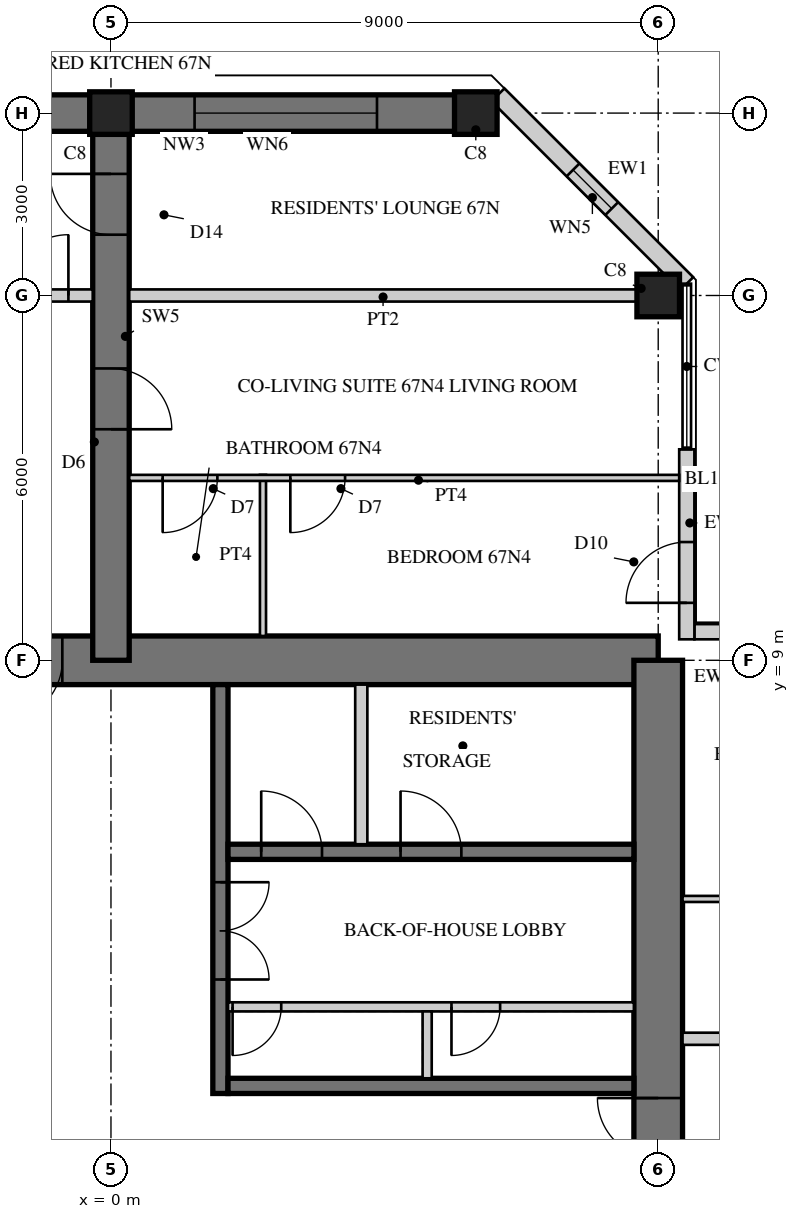
"""IFC4 building model, lengths in metres.
Left out: names, types, materials, properties, quantities, classifications, styles, units other than length and angle.
Written with IfcOpenShell. Run it as: python <this file> out.ifc"""

import sys

from ifc_helpers import new_model, si_unit, direction, frame, frame_2d, origin, origin_2d, place, context, subcontext, project, spatial, rectangle, hollow_rectangle, extrude, element, fill, save


model = new_model("IFC4")
c1 = context("Model", 3, precision=1e-05, world=origin(), true_north=direction((0.0, 1.0)))
c2 = subcontext(c1, "Body", "Model", "MODEL_VIEW")
j1 = project(units=[si_unit("LENGTHUNIT", "METRE"), si_unit("PLANEANGLEUNIT", "RADIAN")], contexts=[c1])
p1 = place(None, origin())
s1 = spatial("IfcSite", under=j1, at=p1, CompositionType="ELEMENT")
p2 = place(p1, origin())
s2 = spatial("IfcBuilding", under=s1, at=p2, CompositionType="ELEMENT")
p3 = place(p2, frame((0.0, 0.0, 261.1)))
s3 = spatial("IfcBuildingStorey", under=s2, at=p3, CompositionType="ELEMENT", Elevation=261.1)
p4 = place(p3, frame((9.0, 9.0, 0.0), z_axis=(0.0, 0.0, 1.0), x_axis=(-1.0, 0.0, 0.0)))
e1 = element("IfcWall", 1, at=p4, inside=s3, PredefinedType="SHEAR", context=c2, shape_type="SweptSolid", body=[
    extrude(rectangle(XDim=18.0, YDim=0.8, at=frame_2d((9.0, 0.0))), origin(), (0.0, 0.0, 1.0), 3.4),
])
p5 = place(p4, frame((9.8, 0.0, 0.0)))
e2 = element("IfcOpeningElement", 2, at=p5, cuts=e1, PredefinedType="OPENING", context=c2, shape_type="SweptSolid", body=[
    extrude(rectangle(XDim=1.0, YDim=2.4, at=frame_2d((0.5, 1.2))), frame((0.0, 0.41, 0.0), z_axis=(0.0, -1.0, 0.0), x_axis=(1.0, 0.0, 0.0)), (0.0, 0.0, 1.0), 0.82),
])
p6 = place(p3, frame((9.0, -9.0, 0.0), z_axis=(0.0, 0.0, 1.0), x_axis=(0.0, 1.0, 0.0)))
e3 = element("IfcWall", 3, at=p6, inside=s3, PredefinedType="SHEAR", context=c2, shape_type="SweptSolid", body=[
    extrude(rectangle(XDim=18.0, YDim=0.8, at=frame_2d((9.0, 0.0))), origin(), (0.0, 0.0, 1.0), 3.4),
])
p7 = place(p6, frame((9.8, 0.0, 0.0)))
e4 = element("IfcOpeningElement", 4, at=p7, cuts=e3, PredefinedType="OPENING", context=c2, shape_type="SweptSolid", body=[
    extrude(rectangle(XDim=1.0, YDim=2.4, at=frame_2d((0.5, 1.2))), frame((0.0, 0.41, 0.0), z_axis=(0.0, -1.0, 0.0), x_axis=(1.0, 0.0, 0.0)), (0.0, 0.0, 1.0), 0.82),
])
p8 = place(p3, frame((1.8, 1.875, 0.0), z_axis=(0.0, 0.0, 1.0), x_axis=(0.0, 1.0, 0.0)))
e5 = element("IfcWall", 5, at=p8, inside=s3, PredefinedType="SHEAR", context=c2, shape_type="SweptSolid", body=[
    extrude(rectangle(XDim=6.725, YDim=0.25, at=frame_2d((3.363, 0.0))), origin(), (0.0, 0.0, 1.0), 3.4),
])
p9 = place(p8, frame((1.875, 0.0, 0.0)))
e6 = element("IfcOpeningElement", 6, at=p9, cuts=e5, PredefinedType="OPENING", context=c2, shape_type="SweptSolid", body=[
    extrude(rectangle(XDim=1.6, YDim=2.4, at=frame_2d((0.8, 1.2))), frame((0.0, 0.135, 0.0), z_axis=(0.0, -1.0, 0.0), x_axis=(1.0, 0.0, 0.0)), (0.0, 0.0, 1.0), 0.27),
])
p10 = place(p3, frame((1.925, 2.0, 0.0), z_axis=(0.0, 0.0, 1.0), x_axis=(1.0, 0.0, 0.0)))
e7 = element("IfcWall", 7, at=p10, inside=s3, PredefinedType="SHEAR", context=c2, shape_type="SweptSolid", body=[
    extrude(rectangle(XDim=6.675, YDim=0.25, at=frame_2d((3.337, 0.0))), origin(), (0.0, 0.0, 1.0), 3.4),
])
p11 = place(p3, frame((1.925, 5.85, 0.0), z_axis=(0.0, 0.0, 1.0), x_axis=(1.0, 0.0, 0.0)))
e8 = element("IfcWall", 8, at=p11, inside=s3, PredefinedType="SHEAR", context=c2, shape_type="SweptSolid", body=[
    extrude(rectangle(XDim=6.675, YDim=0.25, at=frame_2d((3.337, 0.0))), origin(), (0.0, 0.0, 1.0), 3.4),
])
p12 = place(p11, frame((0.546, 0.0, 0.0)))
e9 = element("IfcOpeningElement", 9, at=p12, cuts=e8, PredefinedType="OPENING", context=c2, shape_type="SweptSolid", body=[
    extrude(rectangle(XDim=1.0, YDim=2.1, at=frame_2d((0.5, 1.05))), frame((0.0, 0.135, 0.0), z_axis=(0.0, -1.0, 0.0), x_axis=(1.0, 0.0, 0.0)), (0.0, 0.0, 1.0), 0.27),
])
p13 = place(p11, frame((2.837, 0.0, 0.0)))
e10 = element("IfcOpeningElement", 10, at=p13, cuts=e8, PredefinedType="OPENING", context=c2, shape_type="SweptSolid", body=[
    extrude(rectangle(XDim=1.0, YDim=2.1, at=frame_2d((0.5, 1.05))), frame((0.0, 0.135, 0.0), z_axis=(0.0, -1.0, 0.0), x_axis=(1.0, 0.0, 0.0)), (0.0, 0.0, 1.0), 0.27),
])
p14 = place(p3, frame((1.925, 3.3, 0.0), z_axis=(0.0, 0.0, 1.0), x_axis=(1.0, 0.0, 0.0)))
e11 = element("IfcWall", 11, at=p14, inside=s3, PredefinedType="PARTITIONING", context=c2, shape_type="SweptSolid", body=[
    extrude(rectangle(XDim=6.675, YDim=0.15, at=frame_2d((3.337, 0.0))), origin(), (0.0, 0.0, 1.0), 3.4),
])
p15 = place(p14, frame((0.075, 0.0, 0.0)))
e12 = element("IfcOpeningElement", 12, at=p15, cuts=e11, PredefinedType="OPENING", context=c2, shape_type="SweptSolid", body=[
    extrude(rectangle(XDim=0.8, YDim=2.1, at=frame_2d((0.4, 1.05))), frame((0.0, 0.085, 0.0), z_axis=(0.0, -1.0, 0.0), x_axis=(1.0, 0.0, 0.0)), (0.0, 0.0, 1.0), 0.17),
])
p16 = place(p14, frame((3.675, 0.0, 0.0)))
e13 = element("IfcOpeningElement", 13, at=p16, cuts=e11, PredefinedType="OPENING", context=c2, shape_type="SweptSolid", body=[
    extrude(rectangle(XDim=0.8, YDim=2.1, at=frame_2d((0.4, 1.05))), frame((0.0, 0.085, 0.0), z_axis=(0.0, -1.0, 0.0), x_axis=(1.0, 0.0, 0.0)), (0.0, 0.0, 1.0), 0.17),
])
p17 = place(p3, frame((5.2, 2.125, 0.0), z_axis=(0.0, 0.0, 1.0), x_axis=(0.0, 1.0, 0.0)))
e14 = element("IfcWall", 14, at=p17, inside=s3, PredefinedType="PARTITIONING", context=c2, shape_type="SweptSolid", body=[
    extrude(rectangle(XDim=1.1, YDim=0.15, at=frame_2d((0.55, 0.0))), origin(), (0.0, 0.0, 1.0), 3.4),
])
p18 = place(p3, frame((4.117, 5.975, 0.0), z_axis=(0.0, 0.0, 1.0), x_axis=(0.0, 1.0, 0.0)))
e15 = element("IfcWall", 15, at=p18, inside=s3, PredefinedType="PARTITIONING", context=c2, shape_type="SweptSolid", body=[
    extrude(rectangle(XDim=2.625, YDim=0.2, at=frame_2d((1.312, 0.0))), origin(), (0.0, 0.0, 1.0), 3.4),
])
p19 = place(p3, frame((0.0, 9.0, 0.0), z_axis=(0.0, 0.0, 1.0), x_axis=(0.0, 1.0, 0.0)))
e16 = element("IfcWall", 16, at=p19, inside=s3, PredefinedType="SHEAR", context=c2, shape_type="SweptSolid", body=[
    extrude(rectangle(XDim=9.0, YDim=0.6, at=frame_2d((4.5, 0.0))), origin(), (0.0, 0.0, 1.0), 3.4),
])
p20 = place(p19, frame((3.8, 0.0, 0.0)))
e17 = element("IfcOpeningElement", 17, at=p20, cuts=e16, PredefinedType="OPENING", context=c2, shape_type="SweptSolid", body=[
    extrude(rectangle(XDim=1.0, YDim=2.15, at=frame_2d((0.5, 1.075))), frame((0.0, 0.31, 0.0), z_axis=(0.0, -1.0, 0.0), x_axis=(1.0, 0.0, 0.0)), (0.0, 0.0, 1.0), 0.62),
])
p21 = place(p19, frame((7.0, 0.0, 0.0)))
e18 = element("IfcOpeningElement", 18, at=p21, cuts=e16, PredefinedType="OPENING", context=c2, shape_type="SweptSolid", body=[
    extrude(rectangle(XDim=1.0, YDim=2.2, at=frame_2d((0.5, 1.1))), frame((0.0, 0.31, 0.0), z_axis=(0.0, -1.0, 0.0), x_axis=(1.0, 0.0, 0.0)), (0.0, 0.0, 1.0), 0.62),
])
p22 = place(p3, frame((6.0, 18.0, 0.0), z_axis=(0.0, 0.0, 1.0), x_axis=(-1.0, 0.0, 0.0)))
e19 = element("IfcWall", 19, at=p22, inside=s3, PredefinedType="SHEAR", context=c2, shape_type="SweptSolid", body=[
    extrude(rectangle(XDim=12.0, YDim=0.6, at=frame_2d((6.0, 0.0))), origin(), (0.0, 0.0, 1.0), 3.4),
])
p23 = place(p22, frame((1.625, 0.0, 0.6)))
e20 = element("IfcOpeningElement", 20, at=p23, cuts=e19, PredefinedType="OPENING", context=c2, shape_type="SweptSolid", body=[
    extrude(rectangle(XDim=3.0, YDim=2.4, at=frame_2d((1.5, 1.2))), frame((0.0, 0.31, 0.0), z_axis=(0.0, -1.0, 0.0), x_axis=(1.0, 0.0, 0.0)), (0.0, 0.0, 1.0), 0.62),
])
p24 = place(p22, frame((7.375, 0.0, 0.6)))
e21 = element("IfcOpeningElement", 21, at=p24, cuts=e19, PredefinedType="OPENING", context=c2, shape_type="SweptSolid", body=[
    extrude(rectangle(XDim=3.0, YDim=2.4, at=frame_2d((1.5, 1.2))), frame((0.0, 0.31, 0.0), z_axis=(0.0, -1.0, 0.0), x_axis=(1.0, 0.0, 0.0)), (0.0, 0.0, 1.0), 0.62),
])
for number, where, z_axis, x_axis in (
    (22, (9.0, 15.0, 0.0), (0.0, 0.0, 1.0), (1.0, 0.0, 0.0)),
    (23, (6.0, 18.0, 0.0), (0.0, 0.0, 1.0), (1.0, 0.0, 0.0)),
    (24, (0.0, 18.0, 0.0), (0.0, 0.0, 1.0), (1.0, 0.0, 0.0)),
):
    element("IfcColumn", number, at=place(p3, frame(where, z_axis=z_axis, x_axis=x_axis)), inside=s3, PredefinedType="COLUMN", context=c2, shape_type="SweptSolid", body=[
        extrude(rectangle(XDim=0.7, YDim=0.7, at=origin_2d()), origin(), (0.0, 0.0, 1.0), 3.4),
    ])
p25 = place(p3, frame((12.47, 9.47, 0.0), z_axis=(0.0, 0.0, 1.0), x_axis=(-1.0, 0.0, 0.0)))
e25 = element("IfcWall", 25, at=p25, inside=s3, PredefinedType="SOLIDWALL", context=c2, shape_type="SweptSolid", body=[
    extrude(rectangle(XDim=2.875, YDim=0.25, at=frame_2d((1.438, 0.0))), origin(), (0.0, 0.0, 1.0), 3.22),
])
p26 = place(p25, frame((0.6, 0.0, 0.0)))
e26 = element("IfcOpeningElement", 26, at=p26, cuts=e25, PredefinedType="OPENING", context=c2, shape_type="SweptSolid", body=[
    extrude(rectangle(XDim=1.0, YDim=2.2, at=frame_2d((0.5, 1.1))), frame((0.0, 0.135, 0.0), z_axis=(0.0, -1.0, 0.0), x_axis=(1.0, 0.0, 0.0)), (0.0, 0.0, 1.0), 0.27),
])
p27 = place(p3, frame((9.47, 9.345, 0.0), z_axis=(0.0, 0.0, 1.0), x_axis=(0.0, 1.0, 0.0)))
e27 = element("IfcWall", 27, at=p27, inside=s3, PredefinedType="SOLIDWALL", context=c2, shape_type="SweptSolid", body=[
    extrude(rectangle(XDim=3.125, YDim=0.25, at=frame_2d((1.562, 0.0))), origin(), (0.0, 0.0, 1.0), 3.22),
])
p28 = place(p27, frame((0.6, 0.0, 0.0)))
e28 = element("IfcOpeningElement", 28, at=p28, cuts=e27, PredefinedType="OPENING", context=c2, shape_type="SweptSolid", body=[
    extrude(rectangle(XDim=1.0, YDim=2.2, at=frame_2d((0.5, 1.1))), frame((0.0, 0.135, 0.0), z_axis=(0.0, -1.0, 0.0), x_axis=(1.0, 0.0, 0.0)), (0.0, 0.0, 1.0), 0.27),
])
p29 = place(p3, frame((9.47, 15.195, 0.0), z_axis=(0.0, 0.0, 1.0), x_axis=(-0.70707898447, 0.707134576811, 0.0)))
e29 = element("IfcWall", 29, at=p29, inside=s3, PredefinedType="SOLIDWALL", context=c2, shape_type="SweptSolid", body=[
    extrude(rectangle(XDim=4.392, YDim=0.3, at=frame_2d((2.196, 0.0))), origin(), (0.0, 0.0, 1.0), 3.22),
])
p30 = place(p29, frame((1.746, 0.0, 0.3)))
e30 = element("IfcOpeningElement", 30, at=p30, cuts=e29, PredefinedType="OPENING", context=c2, shape_type="SweptSolid", body=[
    extrude(rectangle(XDim=0.9, YDim=2.4, at=frame_2d((0.45, 1.2))), frame((0.0, 0.16, 0.0), z_axis=(0.0, -1.0, 0.0), x_axis=(1.0, 0.0, 0.0)), (0.0, 0.0, 1.0), 0.32),
])
p31 = place(p3, frame((2.5, 9.4, 0.0), z_axis=(0.0, 0.0, 1.0), x_axis=(0.0, 1.0, 0.0)))
e31 = element("IfcWall", 31, at=p31, inside=s3, PredefinedType="PARTITIONING", context=c2, shape_type="SweptSolid", body=[
    extrude(rectangle(XDim=2.65, YDim=0.1, at=frame_2d((1.325, 0.0))), origin(), (0.0, 0.0, 1.0), 3.22),
])
p32 = place(p3, frame((9.345, 12.0, 0.0), z_axis=(0.0, 0.0, 1.0), x_axis=(-1.0, 0.0, 0.0)))
e32 = element("IfcWall", 32, at=p32, inside=s3, PredefinedType="PARTITIONING", context=c2, shape_type="SweptSolid", body=[
    extrude(rectangle(XDim=9.045, YDim=0.1, at=frame_2d((4.522, 0.0))), origin(), (0.0, 0.0, 1.0), 3.22),
])
p33 = place(p32, frame((5.495, 0.0, 0.0)))
e33 = element("IfcOpeningElement", 33, at=p33, cuts=e32, PredefinedType="OPENING", context=c2, shape_type="SweptSolid", body=[
    extrude(rectangle(XDim=0.9, YDim=2.1, at=frame_2d((0.45, 1.05))), frame((0.0, 0.06, 0.0), z_axis=(0.0, -1.0, 0.0), x_axis=(1.0, 0.0, 0.0)), (0.0, 0.0, 1.0), 0.12),
])
p34 = place(p32, frame((7.595, 0.0, 0.0)))
e34 = element("IfcOpeningElement", 34, at=p34, cuts=e32, PredefinedType="OPENING", context=c2, shape_type="SweptSolid", body=[
    extrude(rectangle(XDim=0.9, YDim=2.1, at=frame_2d((0.45, 1.05))), frame((0.0, 0.06, 0.0), z_axis=(0.0, -1.0, 0.0), x_axis=(1.0, 0.0, 0.0)), (0.0, 0.0, 1.0), 0.12),
])
p35 = place(p3, frame((8.65, 15.0, 0.0), z_axis=(0.0, 0.0, 1.0), x_axis=(-1.0, 0.0, 0.0)))
e35 = element("IfcWall", 35, at=p35, inside=s3, PredefinedType="SOLIDWALL", context=c2, shape_type="SweptSolid", body=[
    extrude(rectangle(XDim=8.35, YDim=0.2, at=frame_2d((4.175, 0.0))), origin(), (0.0, 0.0, 1.0), 2.52),
])
p36 = place(p3, frame((-0.3, 15.0, 0.0), z_axis=(0.0, 0.0, 1.0), x_axis=(-1.0, 0.0, 0.0)))
e36 = element("IfcWall", 36, at=p36, inside=s3, PredefinedType="SOLIDWALL", context=c2, shape_type="SweptSolid", body=[
    extrude(rectangle(XDim=8.35, YDim=0.2, at=frame_2d((4.175, 0.0))), origin(), (0.0, 0.0, 1.0), 2.52),
])
p37 = place(p36, frame((0.4, 0.0, 0.0)))
e37 = element("IfcOpeningElement", 37, at=p37, cuts=e36, PredefinedType="OPENING", context=c2, shape_type="SweptSolid", body=[
    extrude(rectangle(XDim=1.0, YDim=2.2, at=frame_2d((0.5, 1.1))), frame((0.0, 0.11, 0.0), z_axis=(0.0, -1.0, 0.0), x_axis=(1.0, 0.0, 0.0)), (0.0, 0.0, 1.0), 0.22),
])
p38 = place(p3, frame((9.4, 5.075, 0.0), z_axis=(0.0, 0.0, 1.0), x_axis=(1.0, 0.0, 0.0)))
e38 = element("IfcWall", 38, at=p38, inside=s3, PredefinedType="PARTITIONING", context=c2, shape_type="SweptSolid", body=[
    extrude(rectangle(XDim=3.25, YDim=0.1, at=frame_2d((1.625, 0.0))), origin(), (0.0, 0.0, 1.0), 3.22),
])
p39 = place(p3, frame((9.4, 2.775, 0.0), z_axis=(0.0, 0.0, 1.0), x_axis=(1.0, 0.0, 0.0)))
e39 = element("IfcWall", 39, at=p39, inside=s3, PredefinedType="SOLIDWALL", context=c2, shape_type="SweptSolid", body=[
    extrude(rectangle(XDim=5.6, YDim=0.2, at=frame_2d((2.8, 0.0))), origin(), (0.0, 0.0, 1.0), 3.22),
])
p40 = place(p39, frame((3.75, 0.0, 0.0)))
e40 = element("IfcOpeningElement", 40, at=p40, cuts=e39, PredefinedType="OPENING", context=c2, shape_type="SweptSolid", body=[
    extrude(rectangle(XDim=1.0, YDim=2.15, at=frame_2d((0.5, 1.075))), frame((0.0, 0.11, 0.0), z_axis=(0.0, -1.0, 0.0), x_axis=(1.0, 0.0, 0.0)), (0.0, 0.0, 1.0), 0.22),
])
p41 = place(p28, origin())
e41 = element("IfcDoor", 41, at=p41, inside=s3, OperationType="SINGLE_SWING_LEFT", PredefinedType="DOOR", context=c2, shape_type="SweptSolid", body=[
    extrude(hollow_rectangle(XDim=1.0, YDim=2.2, WallThickness=0.06, at=frame_2d((0.5, 1.1))), frame((0.0, 0.025, 0.0), z_axis=(0.0, -1.0, 0.0), x_axis=(1.0, 0.0, 0.0)), (0.0, 0.0, 1.0), 0.05),
    extrude(rectangle(XDim=0.879, YDim=2.079, at=frame_2d((0.5, 1.1))), frame((0.0, 0.025, 0.0), z_axis=(0.0, -1.0, 0.0), x_axis=(1.0, 0.0, 0.0)), (0.0, 0.0, 1.0), 0.05),
])
fill(e28, e41)
p42 = place(p30, origin())
e42 = element("IfcWindow", 42, at=p42, inside=s3, PartitioningType="SINGLE_PANEL", PredefinedType="WINDOW", context=c2, shape_type="SweptSolid", body=[
    extrude(hollow_rectangle(XDim=0.9, YDim=2.4, WallThickness=0.06, at=frame_2d((0.45, 1.2))), frame((0.0, 0.03, 0.0), z_axis=(0.0, -1.0, 0.0), x_axis=(1.0, 0.0, 0.0)), (0.0, 0.0, 1.0), 0.06),
    extrude(rectangle(XDim=0.779, YDim=2.279, at=frame_2d((0.45, 1.2))), frame((0.0, 0.03, 0.0), z_axis=(0.0, -1.0, 0.0), x_axis=(1.0, 0.0, 0.0)), (0.0, 0.0, 1.0), 0.06),
])
fill(e30, e42)
p43 = place(p23, origin())
e43 = element("IfcWindow", 43, at=p43, inside=s3, PartitioningType="SINGLE_PANEL", PredefinedType="WINDOW", context=c2, shape_type="SweptSolid", body=[
    extrude(hollow_rectangle(XDim=3.0, YDim=2.4, WallThickness=0.06, at=frame_2d((1.5, 1.2))), frame((0.0, 0.03, 0.0), z_axis=(0.0, -1.0, 0.0), x_axis=(1.0, 0.0, 0.0)), (0.0, 0.0, 1.0), 0.06),
    extrude(rectangle(XDim=2.879, YDim=2.279, at=frame_2d((1.5, 1.2))), frame((0.0, 0.03, 0.0), z_axis=(0.0, -1.0, 0.0), x_axis=(1.0, 0.0, 0.0)), (0.0, 0.0, 1.0), 0.06),
])
fill(e20, e43)
p44 = place(p33, origin())
e44 = element("IfcDoor", 44, at=p44, inside=s3, OperationType="SINGLE_SWING_RIGHT", PredefinedType="DOOR", context=c2, shape_type="SweptSolid", body=[
    extrude(rectangle(XDim=0.9, YDim=2.1, at=frame_2d((0.45, 1.05))), frame((0.0, 0.025, 0.0), z_axis=(0.0, -1.0, 0.0), x_axis=(1.0, 0.0, 0.0)), (0.0, 0.0, 1.0), 0.05),
])
fill(e33, e44)
p45 = place(p34, origin())
e45 = element("IfcDoor", 45, at=p45, inside=s3, OperationType="SINGLE_SWING_RIGHT", PredefinedType="DOOR", context=c2, shape_type="SweptSolid", body=[
    extrude(rectangle(XDim=0.9, YDim=2.1, at=frame_2d((0.45, 1.05))), frame((0.0, 0.025, 0.0), z_axis=(0.0, -1.0, 0.0), x_axis=(1.0, 0.0, 0.0)), (0.0, 0.0, 1.0), 0.05),
])
fill(e34, e45)
p46 = place(p37, frame((1.0, 0.0, 0.0), z_axis=(0.0, 0.0, 1.0), x_axis=(-1.0, 0.0, 0.0)))
e46 = element("IfcDoor", 46, at=p46, inside=s3, OperationType="SINGLE_SWING_RIGHT", PredefinedType="DOOR", context=c2, shape_type="SweptSolid", body=[
    extrude(rectangle(XDim=1.0, YDim=2.2, at=frame_2d((0.5, 1.1))), frame((0.0, 0.025, 0.0), z_axis=(0.0, -1.0, 0.0), x_axis=(1.0, 0.0, 0.0)), (0.0, 0.0, 1.0), 0.05),
])
fill(e37, e46)
p47 = place(p20, frame((1.0, 0.0, 0.0), z_axis=(0.0, 0.0, 1.0), x_axis=(-1.0, 0.0, 0.0)))
e47 = element("IfcDoor", 47, at=p47, inside=s3, OperationType="SINGLE_SWING_RIGHT", PredefinedType="DOOR", context=c2, shape_type="SweptSolid", body=[
    extrude(rectangle(XDim=1.0, YDim=2.15, at=frame_2d((0.5, 1.075))), frame((0.0, 0.025, 0.0), z_axis=(0.0, -1.0, 0.0), x_axis=(1.0, 0.0, 0.0)), (0.0, 0.0, 1.0), 0.05),
])
fill(e17, e47)
p48 = place(p21, origin())
e48 = element("IfcDoor", 48, at=p48, inside=s3, OperationType="SINGLE_SWING_RIGHT", PredefinedType="DOOR", context=c2, shape_type="SweptSolid", body=[
    extrude(rectangle(XDim=1.0, YDim=2.2, at=frame_2d((0.5, 1.1))), frame((0.0, 0.025, 0.0), z_axis=(0.0, -1.0, 0.0), x_axis=(1.0, 0.0, 0.0)), (0.0, 0.0, 1.0), 0.05),
])
fill(e18, e48)
p49 = place(p5, origin())
e49 = element("IfcDoor", 49, at=p49, inside=s3, OperationType="SINGLE_SWING_RIGHT", PredefinedType="DOOR", context=c2, shape_type="SweptSolid", body=[
    extrude(rectangle(XDim=1.0, YDim=2.4, at=frame_2d((0.5, 1.2))), frame((0.0, 0.055, 0.0), z_axis=(0.0, -1.0, 0.0), x_axis=(1.0, 0.0, 0.0)), (0.0, 0.0, 1.0), 0.05),
])
fill(e2, e49)
p50 = place(p7, origin())
e50 = element("IfcDoor", 50, at=p50, inside=s3, OperationType="SINGLE_SWING_RIGHT", PredefinedType="DOOR", context=c2, shape_type="SweptSolid", body=[
    extrude(rectangle(XDim=1.0, YDim=2.4, at=frame_2d((0.5, 1.2))), frame((0.0, 0.055, 0.0), z_axis=(0.0, -1.0, 0.0), x_axis=(1.0, 0.0, 0.0)), (0.0, 0.0, 1.0), 0.05),
])
fill(e4, e50)
p51 = place(p9, frame((1.6, 0.0, 0.0), z_axis=(0.0, 0.0, 1.0), x_axis=(-1.0, 0.0, 0.0)))
e51 = element("IfcDoor", 51, at=p51, inside=s3, OperationType="DOUBLE_DOOR_SINGLE_SWING", PredefinedType="DOOR", context=c2, shape_type="SweptSolid", body=[
    extrude(rectangle(XDim=1.6, YDim=2.4, at=frame_2d((0.8, 1.2))), frame((0.0, 0.025, 0.0), z_axis=(0.0, -1.0, 0.0), x_axis=(1.0, 0.0, 0.0)), (0.0, 0.0, 1.0), 0.05),
])
fill(e6, e51)
p52 = place(p15, frame((0.8, 0.0, 0.0), z_axis=(0.0, 0.0, 1.0), x_axis=(-1.0, 0.0, 0.0)))
e52 = element("IfcDoor", 52, at=p52, inside=s3, OperationType="SINGLE_SWING_RIGHT", PredefinedType="DOOR", context=c2, shape_type="SweptSolid", body=[
    extrude(rectangle(XDim=0.8, YDim=2.1, at=frame_2d((0.4, 1.05))), frame((0.0, 0.025, 0.0), z_axis=(0.0, -1.0, 0.0), x_axis=(1.0, 0.0, 0.0)), (0.0, 0.0, 1.0), 0.05),
])
fill(e12, e52)
p53 = place(p16, frame((0.8, 0.0, 0.0), z_axis=(0.0, 0.0, 1.0), x_axis=(-1.0, 0.0, 0.0)))
e53 = element("IfcDoor", 53, at=p53, inside=s3, OperationType="SINGLE_SWING_RIGHT", PredefinedType="DOOR", context=c2, shape_type="SweptSolid", body=[
    extrude(rectangle(XDim=0.8, YDim=2.1, at=frame_2d((0.4, 1.05))), frame((0.0, 0.025, 0.0), z_axis=(0.0, -1.0, 0.0), x_axis=(1.0, 0.0, 0.0)), (0.0, 0.0, 1.0), 0.05),
])
fill(e13, e53)
p54 = place(p12, origin())
e54 = element("IfcDoor", 54, at=p54, inside=s3, OperationType="SINGLE_SWING_LEFT", PredefinedType="DOOR", context=c2, shape_type="SweptSolid", body=[
    extrude(rectangle(XDim=1.0, YDim=2.1, at=frame_2d((0.5, 1.05))), frame((0.0, 0.025, 0.0), z_axis=(0.0, -1.0, 0.0), x_axis=(1.0, 0.0, 0.0)), (0.0, 0.0, 1.0), 0.05),
])
fill(e9, e54)
p55 = place(p13, origin())
e55 = element("IfcDoor", 55, at=p55, inside=s3, OperationType="SINGLE_SWING_LEFT", PredefinedType="DOOR", context=c2, shape_type="SweptSolid", body=[
    extrude(rectangle(XDim=1.0, YDim=2.1, at=frame_2d((0.5, 1.05))), frame((0.0, 0.025, 0.0), z_axis=(0.0, -1.0, 0.0), x_axis=(1.0, 0.0, 0.0)), (0.0, 0.0, 1.0), 0.05),
])
fill(e10, e55)
save(model, sys.argv[1])
